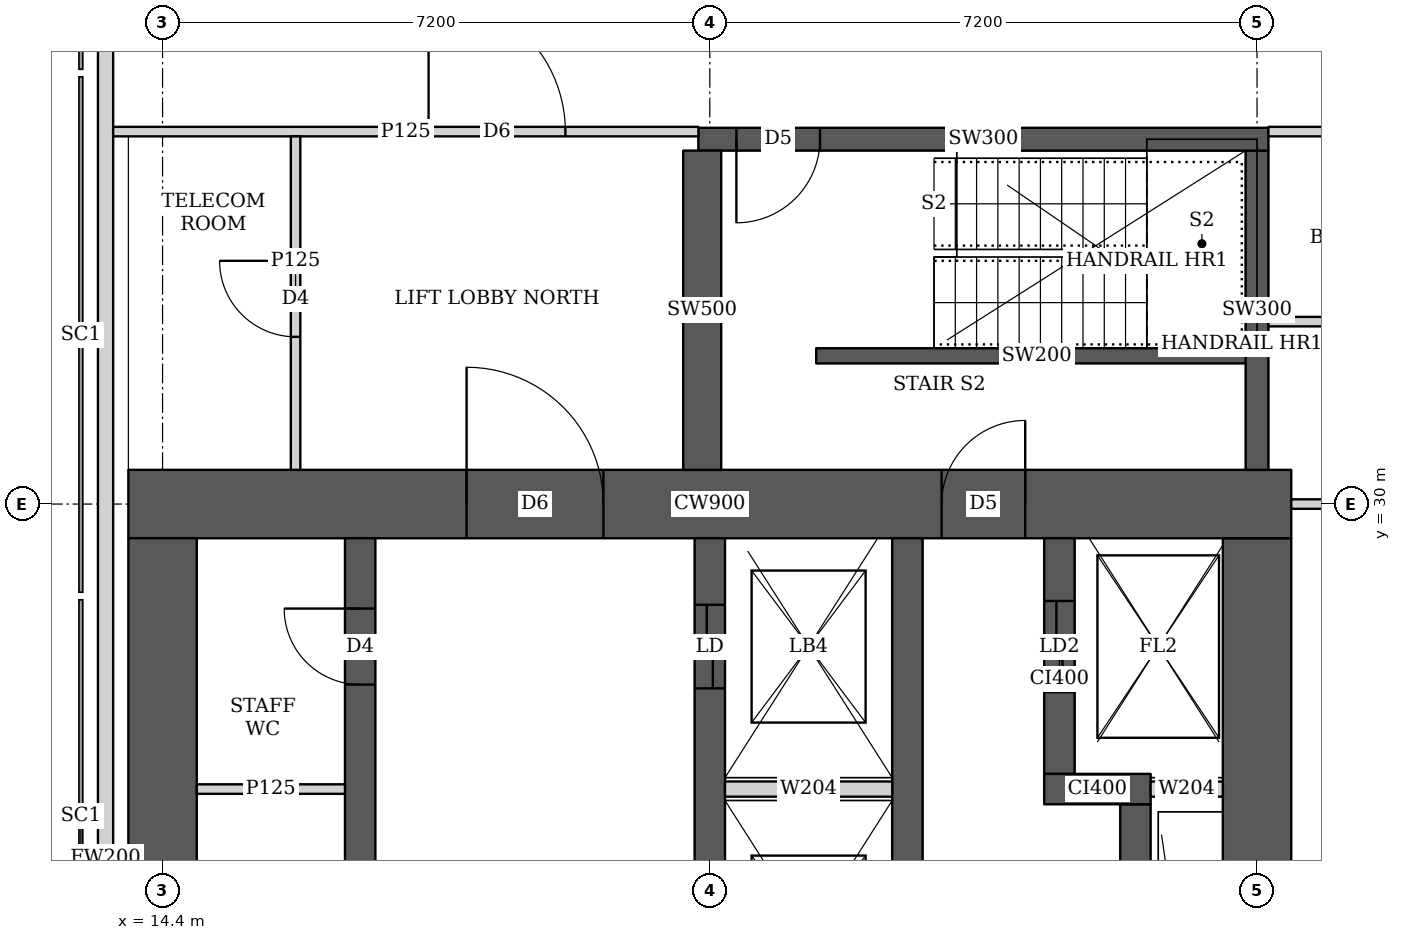
"""IFC4 building model, lengths in metres.
Left out: names, types, materials, properties, quantities, classifications, styles, units other than length and angle.
Written with IfcOpenShell. Run it as: python <this file> out.ifc"""

import sys

from ifc_helpers import new_model, si_unit, direction, frame, frame_2d, origin, place, context, subcontext, project, spatial, rectangle, extrude, element, fill, save


model = new_model("IFC4")
c1 = context("Model", 3, precision=1e-05, world=origin(), true_north=direction((0.0, 1.0)))
c2 = subcontext(c1, "Body", "Model", "MODEL_VIEW")
j1 = project(units=[si_unit("LENGTHUNIT", "METRE"), si_unit("PLANEANGLEUNIT", "RADIAN")], contexts=[c1])
p1 = place(None, origin())
s1 = spatial("IfcSite", under=j1, at=p1, CompositionType="ELEMENT")
p2 = place(p1, origin())
s2 = spatial("IfcBuilding", under=s1, at=p2, CompositionType="ELEMENT")
p3 = place(p2, frame((0.0, 0.0, 289.1)))
s3 = spatial("IfcBuildingStorey", under=s2, at=p3, CompositionType="ELEMENT", Elevation=289.1)
p4 = place(p3, frame((13.95, 30.0, 0.0), z_axis=(0.0, 0.0, 1.0), x_axis=(1.0, 0.0, 0.0)))
e1 = element("IfcWall", 1, at=p4, inside=s3, PredefinedType="SHEAR", context=c2, shape_type="SweptSolid", body=[
    extrude(rectangle(XDim=15.3, YDim=0.9, at=frame_2d((7.65, 0.0))), origin(), (0.0, 0.0, 1.0), 3.75),
])
p5 = place(p4, frame((4.45, 0.0, 0.0)))
e2 = element("IfcOpeningElement", 2, at=p5, cuts=e1, PredefinedType="OPENING", context=c2, shape_type="SweptSolid", body=[
    extrude(rectangle(XDim=1.8, YDim=2.1, at=frame_2d((0.9, 1.05))), frame((0.0, 0.46, 0.0), z_axis=(0.0, -1.0, 0.0), x_axis=(1.0, 0.0, 0.0)), (0.0, 0.0, 1.0), 0.92),
])
p6 = place(p4, frame((10.7, 0.0, 0.0)))
e3 = element("IfcOpeningElement", 3, at=p6, cuts=e1, PredefinedType="OPENING", context=c2, shape_type="SweptSolid", body=[
    extrude(rectangle(XDim=1.1, YDim=2.1, at=frame_2d((0.55, 1.05))), frame((0.0, 0.46, 0.0), z_axis=(0.0, -1.0, 0.0), x_axis=(1.0, 0.0, 0.0)), (0.0, 0.0, 1.0), 0.92),
])
for number, where, z_axis, x_axis in (
    (4, (14.4, 15.45, 0.0), (0.0, 0.0, 1.0), (0.0, 1.0, 0.0)),
    (5, (28.8, 15.45, 0.0), (0.0, 0.0, 1.0), (0.0, 1.0, 0.0)),
):
    element("IfcWall", number, at=place(p3, frame(where, z_axis=z_axis, x_axis=x_axis)), inside=s3, PredefinedType="SHEAR", context=c2, shape_type="SweptSolid", body=[
        extrude(rectangle(XDim=14.1, YDim=0.9, at=frame_2d((7.05, 0.0))), origin(), (0.0, 0.0, 1.0), 3.75),
    ])
p7 = place(p3, frame((17.0, 15.45, 0.0), z_axis=(0.0, 0.0, 1.0), x_axis=(0.0, 1.0, 0.0)))
e6 = element("IfcWall", 6, at=p7, inside=s3, PredefinedType="SHEAR", context=c2, shape_type="SweptSolid", body=[
    extrude(rectangle(XDim=14.1, YDim=0.4, at=frame_2d((7.05, 0.0))), origin(), (0.0, 0.0, 1.0), 3.75),
])
p8 = place(p7, frame((1.05, 0.0, 0.0)))
e7 = element("IfcOpeningElement", 7, at=p8, cuts=e6, PredefinedType="OPENING", context=c2, shape_type="SweptSolid", body=[
    extrude(rectangle(XDim=1.0, YDim=2.1, at=frame_2d((0.5, 1.05))), frame((0.0, 0.21, 0.0), z_axis=(0.0, -1.0, 0.0), x_axis=(1.0, 0.0, 0.0)), (0.0, 0.0, 1.0), 0.42),
])
p9 = place(p7, frame((4.675, 0.0, 0.0)))
e8 = element("IfcOpeningElement", 8, at=p9, cuts=e6, PredefinedType="OPENING", context=c2, shape_type="SweptSolid", body=[
    extrude(rectangle(XDim=1.0, YDim=2.1, at=frame_2d((0.5, 1.05))), frame((0.0, 0.21, 0.0), z_axis=(0.0, -1.0, 0.0), x_axis=(1.0, 0.0, 0.0)), (0.0, 0.0, 1.0), 0.42),
])
p10 = place(p7, frame((8.425, 0.0, 0.0)))
e9 = element("IfcOpeningElement", 9, at=p10, cuts=e6, PredefinedType="OPENING", context=c2, shape_type="SweptSolid", body=[
    extrude(rectangle(XDim=1.0, YDim=2.1, at=frame_2d((0.5, 1.05))), frame((0.0, 0.21, 0.0), z_axis=(0.0, -1.0, 0.0), x_axis=(1.0, 0.0, 0.0)), (0.0, 0.0, 1.0), 0.42),
])
p11 = place(p7, frame((12.175, 0.0, 0.0)))
e10 = element("IfcOpeningElement", 10, at=p11, cuts=e6, PredefinedType="OPENING", context=c2, shape_type="SweptSolid", body=[
    extrude(rectangle(XDim=1.0, YDim=2.1, at=frame_2d((0.5, 1.05))), frame((0.0, 0.21, 0.0), z_axis=(0.0, -1.0, 0.0), x_axis=(1.0, 0.0, 0.0)), (0.0, 0.0, 1.0), 0.42),
])
p12 = place(p3, frame((21.6, 15.45, 0.0), z_axis=(0.0, 0.0, 1.0), x_axis=(0.0, 1.0, 0.0)))
e11 = element("IfcWall", 11, at=p12, inside=s3, PredefinedType="SHEAR", context=c2, shape_type="SweptSolid", body=[
    extrude(rectangle(XDim=14.1, YDim=0.4, at=frame_2d((7.05, 0.0))), origin(), (0.0, 0.0, 1.0), 3.75),
])
p13 = place(p12, frame((0.875, 0.0, 0.0)))
e12 = element("IfcOpeningElement", 12, at=p13, cuts=e11, PredefinedType="OPENING", context=c2, shape_type="SweptSolid", body=[
    extrude(rectangle(XDim=1.1, YDim=2.1, at=frame_2d((0.55, 1.05))), frame((0.0, 0.21, 0.0), z_axis=(0.0, -1.0, 0.0), x_axis=(1.0, 0.0, 0.0)), (0.0, 0.0, 1.0), 0.42),
])
p14 = place(p12, frame((4.625, 0.0, 0.0)))
e13 = element("IfcOpeningElement", 13, at=p14, cuts=e11, PredefinedType="OPENING", context=c2, shape_type="SweptSolid", body=[
    extrude(rectangle(XDim=1.1, YDim=2.1, at=frame_2d((0.55, 1.05))), frame((0.0, 0.21, 0.0), z_axis=(0.0, -1.0, 0.0), x_axis=(1.0, 0.0, 0.0)), (0.0, 0.0, 1.0), 0.42),
])
p15 = place(p12, frame((8.375, 0.0, 0.0)))
e14 = element("IfcOpeningElement", 14, at=p15, cuts=e11, PredefinedType="OPENING", context=c2, shape_type="SweptSolid", body=[
    extrude(rectangle(XDim=1.1, YDim=2.1, at=frame_2d((0.55, 1.05))), frame((0.0, 0.21, 0.0), z_axis=(0.0, -1.0, 0.0), x_axis=(1.0, 0.0, 0.0)), (0.0, 0.0, 1.0), 0.42),
])
p16 = place(p12, frame((12.125, 0.0, 0.0)))
e15 = element("IfcOpeningElement", 15, at=p16, cuts=e11, PredefinedType="OPENING", context=c2, shape_type="SweptSolid", body=[
    extrude(rectangle(XDim=1.1, YDim=2.1, at=frame_2d((0.55, 1.05))), frame((0.0, 0.21, 0.0), z_axis=(0.0, -1.0, 0.0), x_axis=(1.0, 0.0, 0.0)), (0.0, 0.0, 1.0), 0.42),
])
p17 = place(p3, frame((24.2, 15.45, 0.0), z_axis=(0.0, 0.0, 1.0), x_axis=(0.0, 1.0, 0.0)))
e16 = element("IfcWall", 16, at=p17, inside=s3, PredefinedType="SHEAR", context=c2, shape_type="SweptSolid", body=[
    extrude(rectangle(XDim=14.1, YDim=0.4, at=frame_2d((7.05, 0.0))), origin(), (0.0, 0.0, 1.0), 3.75),
])
p18 = place(p3, frame((27.2, 18.95, 0.0), z_axis=(0.0, 0.0, 1.0), x_axis=(0.0, 1.0, 0.0)))
e17 = element("IfcWall", 17, at=p18, inside=s3, PredefinedType="SHEAR", context=c2, shape_type="SweptSolid", body=[
    extrude(rectangle(XDim=7.1, YDim=0.4, at=frame_2d((3.55, 0.0))), origin(), (0.0, 0.0, 1.0), 3.75),
])
p19 = place(p3, frame((26.0, 26.25, 0.0), z_axis=(0.0, 0.0, 1.0), x_axis=(1.0, 0.0, 0.0)))
e18 = element("IfcWall", 18, at=p19, inside=s3, PredefinedType="SHEAR", context=c2, shape_type="SweptSolid", body=[
    extrude(rectangle(XDim=1.4, YDim=0.4, at=frame_2d((0.7, 0.0))), origin(), (0.0, 0.0, 1.0), 3.75),
])
p20 = place(p3, frame((26.2, 26.45, 0.0), z_axis=(0.0, 0.0, 1.0), x_axis=(0.0, 1.0, 0.0)))
e19 = element("IfcWall", 19, at=p20, inside=s3, PredefinedType="SHEAR", context=c2, shape_type="SweptSolid", body=[
    extrude(rectangle(XDim=3.1, YDim=0.4, at=frame_2d((1.55, 0.0))), origin(), (0.0, 0.0, 1.0), 3.75),
])
p21 = place(p20, frame((1.075, 0.0, 0.0)))
e20 = element("IfcOpeningElement", 20, at=p21, cuts=e19, PredefinedType="OPENING", context=c2, shape_type="SweptSolid", body=[
    extrude(rectangle(XDim=1.2, YDim=2.1, at=frame_2d((0.6, 1.05))), frame((0.0, 0.21, 0.0), z_axis=(0.0, -1.0, 0.0), x_axis=(1.0, 0.0, 0.0)), (0.0, 0.0, 1.0), 0.42),
])
p22 = place(p3, frame((21.45, 34.8, 0.0), z_axis=(0.0, 0.0, 1.0), x_axis=(1.0, 0.0, 0.0)))
e21 = element("IfcWall", 21, at=p22, inside=s3, PredefinedType="SHEAR", context=c2, shape_type="SweptSolid", body=[
    extrude(rectangle(XDim=7.5, YDim=0.3, at=frame_2d((3.75, 0.0))), origin(), (0.0, 0.0, 1.0), 3.75),
])
p23 = place(p22, frame((0.5, 0.0, 0.0)))
e22 = element("IfcOpeningElement", 22, at=p23, cuts=e21, PredefinedType="OPENING", context=c2, shape_type="SweptSolid", body=[
    extrude(rectangle(XDim=1.1, YDim=2.1, at=frame_2d((0.55, 1.05))), frame((0.0, 0.16, 0.0), z_axis=(0.0, -1.0, 0.0), x_axis=(1.0, 0.0, 0.0)), (0.0, 0.0, 1.0), 0.32),
])
p24 = place(p3, frame((21.5, 30.45, 0.0), z_axis=(0.0, 0.0, 1.0), x_axis=(0.0, 1.0, 0.0)))
e23 = element("IfcWall", 23, at=p24, inside=s3, PredefinedType="SHEAR", context=c2, shape_type="SweptSolid", body=[
    extrude(rectangle(XDim=4.2, YDim=0.5, at=frame_2d((2.1, 0.0))), origin(), (0.0, 0.0, 1.0), 3.75),
])
p25 = place(p3, frame((28.8, 30.45, 0.0), z_axis=(0.0, 0.0, 1.0), x_axis=(0.0, 1.0, 0.0)))
e24 = element("IfcWall", 24, at=p25, inside=s3, PredefinedType="SHEAR", context=c2, shape_type="SweptSolid", body=[
    extrude(rectangle(XDim=4.2, YDim=0.3, at=frame_2d((2.1, 0.0))), origin(), (0.0, 0.0, 1.0), 3.75),
])
p26 = place(p3, frame((13.65, 43.037, 0.0), z_axis=(0.0, 0.0, 1.0), x_axis=(0.0, -1.0, 0.0)))
e25 = element("IfcWall", 25, at=p26, inside=s3, PredefinedType="SOLIDWALL", context=c2, shape_type="SweptSolid", body=[
    extrude(rectangle(XDim=35.374, YDim=0.2, at=frame_2d((17.687, 0.0))), origin(), (0.0, 0.0, 1.0), 3.5),
])
p27 = place(p3, frame((13.75, 34.9, 0.0), z_axis=(0.0, 0.0, 1.0), x_axis=(1.0, 0.0, 0.0)))
e26 = element("IfcWall", 26, at=p27, inside=s3, PredefinedType="PARTITIONING", context=c2, shape_type="SweptSolid", body=[
    extrude(rectangle(XDim=7.7, YDim=0.125, at=frame_2d((3.85, 0.0))), origin(), (0.0, 0.0, 1.0), 3.5),
])
p28 = place(p27, frame((4.15, 0.0, 0.0)))
e27 = element("IfcOpeningElement", 27, at=p28, cuts=e26, PredefinedType="OPENING", context=c2, shape_type="SweptSolid", body=[
    extrude(rectangle(XDim=1.8, YDim=2.1, at=frame_2d((0.9, 1.05))), frame((0.0, 0.073, 0.0), z_axis=(0.0, -1.0, 0.0), x_axis=(1.0, 0.0, 0.0)), (0.0, 0.0, 1.0), 0.145),
])
p29 = place(p3, frame((16.15, 30.45, 0.0), z_axis=(0.0, 0.0, 1.0), x_axis=(0.0, 1.0, 0.0)))
e28 = element("IfcWall", 28, at=p29, inside=s3, PredefinedType="PARTITIONING", context=c2, shape_type="SweptSolid", body=[
    extrude(rectangle(XDim=4.387, YDim=0.125, at=frame_2d((2.193, 0.0))), origin(), (0.0, 0.0, 1.0), 3.5),
])
p30 = place(p29, frame((1.75, 0.0, 0.0)))
e29 = element("IfcOpeningElement", 29, at=p30, cuts=e28, PredefinedType="OPENING", context=c2, shape_type="SweptSolid", body=[
    extrude(rectangle(XDim=1.0, YDim=2.1, at=frame_2d((0.5, 1.05))), frame((0.0, 0.073, 0.0), z_axis=(0.0, -1.0, 0.0), x_axis=(1.0, 0.0, 0.0)), (0.0, 0.0, 1.0), 0.145),
])
p31 = place(p3, frame((28.95, 34.9, 0.0), z_axis=(0.0, 0.0, 1.0), x_axis=(1.0, 0.0, 0.0)))
e30 = element("IfcWall", 30, at=p31, inside=s3, PredefinedType="PARTITIONING", context=c2, shape_type="SweptSolid", body=[
    extrude(rectangle(XDim=4.588, YDim=0.125, at=frame_2d((2.294, 0.0))), origin(), (0.0, 0.0, 1.0), 3.5),
])
p32 = place(p3, frame((29.25, 30.0, 0.0), z_axis=(0.0, 0.0, 1.0), x_axis=(1.0, 0.0, 0.0)))
e31 = element("IfcWall", 31, at=p32, inside=s3, PredefinedType="PARTITIONING", context=c2, shape_type="SweptSolid", body=[
    extrude(rectangle(XDim=3.049, YDim=0.125, at=frame_2d((1.524, 0.0))), origin(), (0.0, 0.0, 1.0), 3.5),
])
p33 = place(p3, frame((28.95, 32.4, 0.0), z_axis=(0.0, 0.0, 1.0), x_axis=(1.0, 0.0, 0.0)))
e32 = element("IfcWall", 32, at=p33, inside=s3, PredefinedType="PARTITIONING", context=c2, shape_type="SweptSolid", body=[
    extrude(rectangle(XDim=4.976, YDim=0.125, at=frame_2d((2.488, 0.0))), origin(), (0.0, 0.0, 1.0), 3.5),
])
p34 = place(p3, frame((14.85, 26.25, 0.0), z_axis=(0.0, 0.0, 1.0), x_axis=(1.0, 0.0, 0.0)))
e33 = element("IfcWall", 33, at=p34, inside=s3, PredefinedType="PARTITIONING", context=c2, shape_type="SweptSolid", body=[
    extrude(rectangle(XDim=1.95, YDim=0.125, at=frame_2d((0.975, 0.0))), origin(), (0.0, 0.0, 1.0), 3.5),
])
p35 = place(p3, frame((23.0, 31.95, 0.0), z_axis=(0.0, 0.0, 1.0), x_axis=(1.0, 0.0, 0.0)))
e34 = element("IfcWall", 34, at=p35, inside=s3, PredefinedType="SHEAR", context=c2, shape_type="SweptSolid", body=[
    extrude(rectangle(XDim=5.8, YDim=0.2, at=frame_2d((2.9, 0.0))), origin(), (0.0, 0.0, 1.0), 3.75),
])
p36 = place(p3, frame((21.8, 26.25, 0.0), z_axis=(0.0, 0.0, 1.0), x_axis=(1.0, 0.0, 0.0)))
e35 = element("IfcWall", 35, at=p36, inside=s3, PredefinedType="SOLIDWALL", context=c2, shape_type="SweptSolid", body=[
    extrude(rectangle(XDim=2.2, YDim=0.2, at=frame_2d((1.1, 0.0))), origin(), (0.0, 0.0, 1.0), 3.5),
])
p37 = place(p3, frame((27.4, 26.25, 0.0), z_axis=(0.0, 0.0, 1.0), x_axis=(1.0, 0.0, 0.0)))
e36 = element("IfcWall", 36, at=p37, inside=s3, PredefinedType="SOLIDWALL", context=c2, shape_type="SweptSolid", body=[
    extrude(rectangle(XDim=0.95, YDim=0.2, at=frame_2d((0.475, 0.0))), origin(), (0.0, 0.0, 1.0), 3.5),
])
p38 = place(p30, origin())
e37 = element("IfcDoor", 37, at=p38, inside=s3, OperationType="SINGLE_SWING_RIGHT", PredefinedType="DOOR", context=c2, shape_type="SweptSolid", body=[
    extrude(rectangle(XDim=1.0, YDim=2.1, at=frame_2d((0.5, 1.05))), frame((0.0, 0.025, 0.0), z_axis=(0.0, -1.0, 0.0), x_axis=(1.0, 0.0, 0.0)), (0.0, 0.0, 1.0), 0.05),
])
fill(e29, e37)
p39 = place(p28, origin())
e38 = element("IfcDoor", 38, at=p39, inside=s3, OperationType="DOUBLE_DOOR_SINGLE_SWING", PredefinedType="DOOR", context=c2, shape_type="SweptSolid", body=[
    extrude(rectangle(XDim=1.8, YDim=2.1, at=frame_2d((0.9, 1.05))), frame((0.0, 0.025, 0.0), z_axis=(0.0, -1.0, 0.0), x_axis=(1.0, 0.0, 0.0)), (0.0, 0.0, 1.0), 0.05),
])
fill(e27, e38)
p40 = place(p11, origin())
e39 = element("IfcDoor", 39, at=p40, inside=s3, OperationType="SINGLE_SWING_RIGHT", PredefinedType="DOOR", context=c2, shape_type="SweptSolid", body=[
    extrude(rectangle(XDim=1.0, YDim=2.1, at=frame_2d((0.5, 1.05))), frame((0.0, 0.025, 0.0), z_axis=(0.0, -1.0, 0.0), x_axis=(1.0, 0.0, 0.0)), (0.0, 0.0, 1.0), 0.05),
])
fill(e10, e39)
p41 = place(p5, origin())
e40 = element("IfcDoor", 40, at=p41, inside=s3, OperationType="DOUBLE_DOOR_SINGLE_SWING", PredefinedType="DOOR", context=c2, shape_type="SweptSolid", body=[
    extrude(rectangle(XDim=1.8, YDim=2.1, at=frame_2d((0.9, 1.05))), frame((0.0, 0.025, 0.0), z_axis=(0.0, -1.0, 0.0), x_axis=(1.0, 0.0, 0.0)), (0.0, 0.0, 1.0), 0.05),
])
fill(e2, e40)
p42 = place(p6, origin())
e41 = element("IfcDoor", 41, at=p42, inside=s3, OperationType="SINGLE_SWING_RIGHT", PredefinedType="DOOR", context=c2, shape_type="SweptSolid", body=[
    extrude(rectangle(XDim=1.1, YDim=2.1, at=frame_2d((0.55, 1.05))), frame((0.0, 0.025, 0.0), z_axis=(0.0, -1.0, 0.0), x_axis=(1.0, 0.0, 0.0)), (0.0, 0.0, 1.0), 0.05),
])
fill(e3, e41)
p43 = place(p21, origin())
e42 = element("IfcDoor", 42, at=p43, inside=s3, OperationType="DOUBLE_DOOR_SLIDING", PredefinedType="DOOR", context=c2, shape_type="SweptSolid", body=[
    extrude(rectangle(XDim=1.2, YDim=2.1, at=frame_2d((0.6, 1.05))), frame((0.0, 0.025, 0.0), z_axis=(0.0, -1.0, 0.0), x_axis=(1.0, 0.0, 0.0)), (0.0, 0.0, 1.0), 0.05),
])
fill(e20, e42)
p44 = place(p16, origin())
e43 = element("IfcDoor", 43, at=p44, inside=s3, OperationType="DOUBLE_DOOR_SLIDING", PredefinedType="DOOR", context=c2, shape_type="SweptSolid", body=[
    extrude(rectangle(XDim=1.1, YDim=2.1, at=frame_2d((0.55, 1.05))), frame((0.0, 0.025, 0.0), z_axis=(0.0, -1.0, 0.0), x_axis=(1.0, 0.0, 0.0)), (0.0, 0.0, 1.0), 0.05),
])
fill(e15, e43)
p45 = place(p23, origin())
e44 = element("IfcDoor", 44, at=p45, inside=s3, OperationType="SINGLE_SWING_RIGHT", PredefinedType="DOOR", context=c2, shape_type="SweptSolid", body=[
    extrude(rectangle(XDim=1.1, YDim=2.1, at=frame_2d((0.55, 1.05))), frame((0.0, 0.025, 0.0), z_axis=(0.0, -1.0, 0.0), x_axis=(1.0, 0.0, 0.0)), (0.0, 0.0, 1.0), 0.05),
])
fill(e22, e44)
save(model, sys.argv[1])
